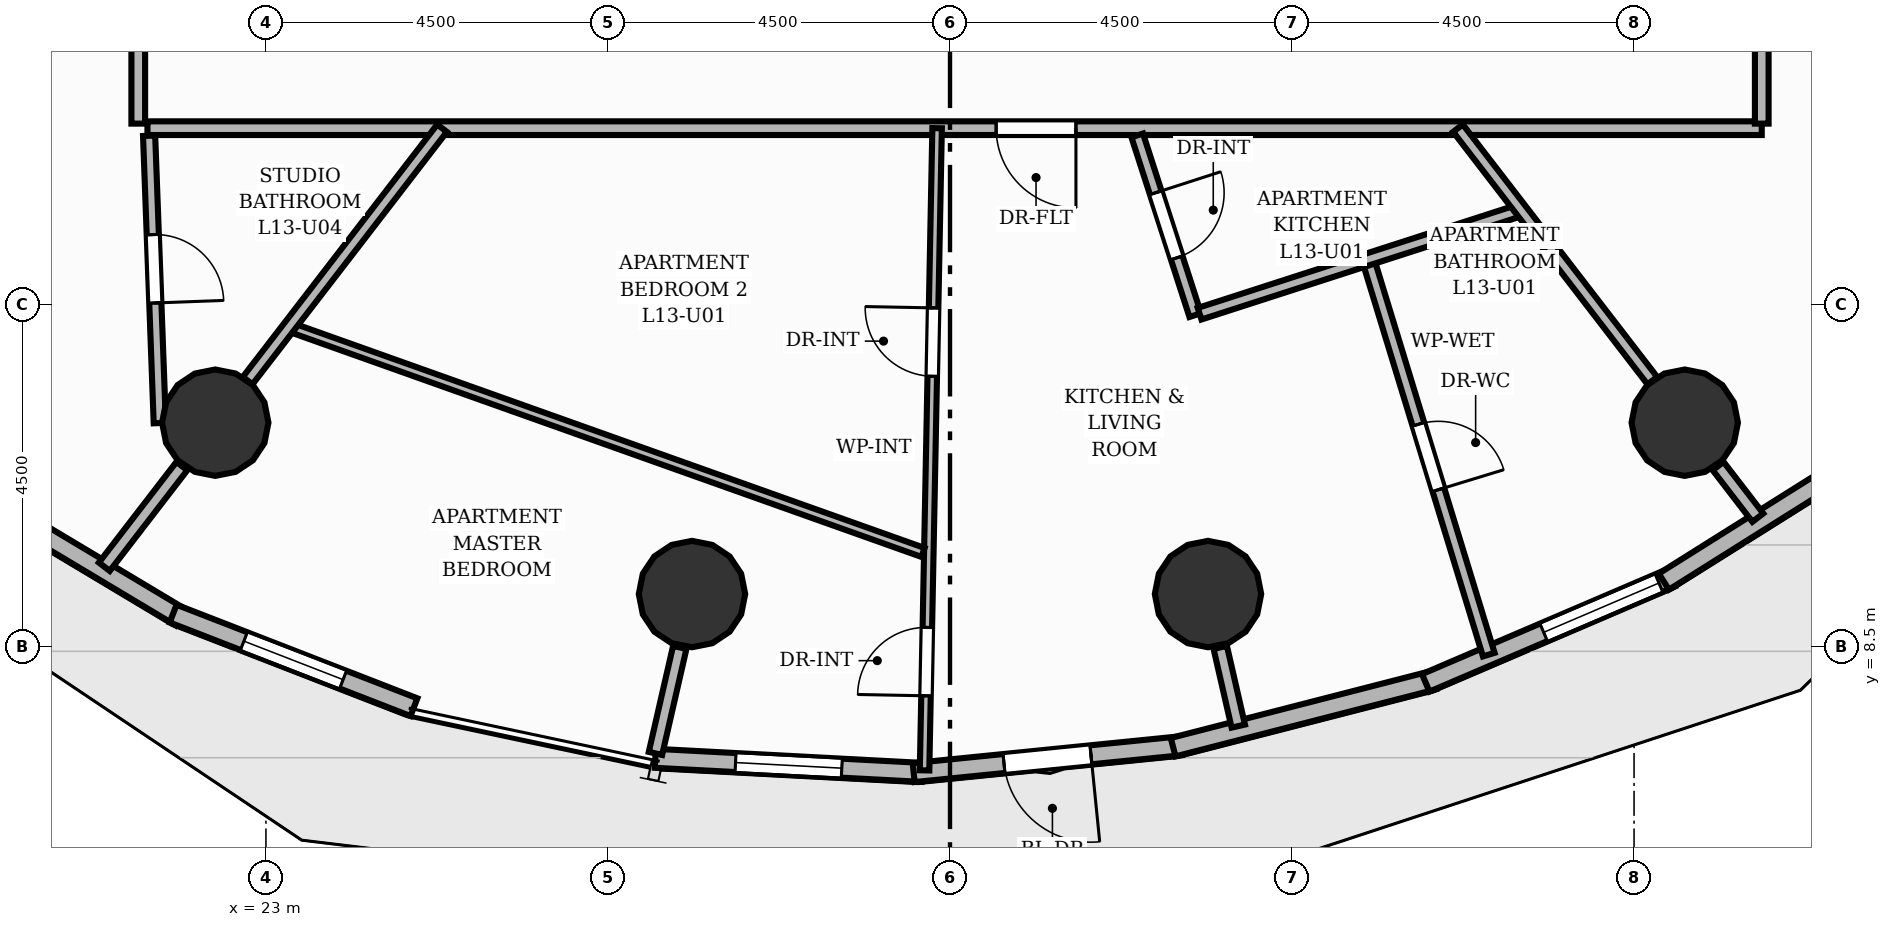
"""IFC4 building model, lengths in metres.
Left out: names, types, materials, properties, quantities, classifications, styles, units other than length and angle.
Written with IfcOpenShell. Run it as: python <this file> out.ifc"""

import sys

from ifc_helpers import new_model, si_unit, direction, frame, frame_2d, origin, origin_2d, place, context, subcontext, project, spatial, rectangle, circle, extrude, element, fill, save


model = new_model("IFC4")
c1 = context("Model", 3, precision=1e-05, world=origin(), true_north=direction((0.0, 1.0)))
c2 = subcontext(c1, "Body", "Model", "MODEL_VIEW")
j1 = project(units=[si_unit("LENGTHUNIT", "METRE"), si_unit("PLANEANGLEUNIT", "RADIAN")], contexts=[c1])
p1 = place(None, origin())
s1 = spatial("IfcSite", under=j1, at=p1, CompositionType="ELEMENT")
p2 = place(p1, origin())
s2 = spatial("IfcBuilding", under=s1, at=p2, CompositionType="ELEMENT")
p3 = place(p2, frame((0.0, 0.0, 47.2)))
s3 = spatial("IfcBuildingStorey", under=s2, at=p3, CompositionType="ELEMENT", Elevation=47.2)
for number, where, z_axis, x_axis in (
    (1, (22.333, 11.445, 0.0), (0.0, 0.0, 1.0), (1.0, 0.0, 0.0)),
    (2, (28.605, 9.19, 0.0), (0.0, 0.0, 1.0), (1.0, 0.0, 0.0)),
    (3, (35.395, 9.19, 0.0), (0.0, 0.0, 1.0), (1.0, 0.0, 0.0)),
    (4, (41.667, 11.445, 0.0), (0.0, 0.0, 1.0), (1.0, 0.0, 0.0)),
):
    element("IfcColumn", number, at=place(p3, frame(where, z_axis=z_axis, x_axis=x_axis)), inside=s3, PredefinedType="COLUMN", context=c2, shape_type="SweptSolid", body=[
        extrude(circle(Radius=0.7, at=origin_2d()), origin(), (0.0, 0.0, 1.0), 3.2),
    ])
p4 = place(p3, frame((21.878, 8.884, 0.0), z_axis=(0.0, 0.0, 1.0), x_axis=(-0.858069400356, 0.513533742001, 0.0)))
e5 = element("IfcWall", 5, at=p4, inside=s3, PredefinedType="SOLIDWALL", context=c2, shape_type="SweptSolid", body=[
    extrude(rectangle(XDim=3.323, YDim=0.25, at=frame_2d((1.661, 0.0))), origin(), (0.0, 0.0, 1.0), 2.96),
])
p5 = place(p3, frame((24.947, 7.702, 0.0), z_axis=(0.0, 0.0, 1.0), x_axis=(-0.932140755825, 0.362096135479, 0.0)))
e6 = element("IfcWall", 6, at=p5, inside=s3, PredefinedType="SOLIDWALL", context=c2, shape_type="SweptSolid", body=[
    extrude(rectangle(XDim=3.399, YDim=0.25, at=frame_2d((1.699, 0.0))), origin(), (0.0, 0.0, 1.0), 2.96),
])
p6 = place(p5, frame((1.0, 0.0, 0.85)))
e7 = element("IfcOpeningElement", 7, at=p6, cuts=e6, PredefinedType="OPENING", context=c2, shape_type="SweptSolid", body=[
    extrude(rectangle(XDim=1.4, YDim=1.55, at=frame_2d((0.7, 0.775))), frame((0.0, 0.135, 0.0), z_axis=(0.0, -1.0, 0.0), x_axis=(1.0, 0.0, 0.0)), (0.0, 0.0, 1.0), 0.27),
])
p7 = place(p3, frame((31.631, 6.844, 0.0), z_axis=(0.0, 0.0, 1.0), x_axis=(-0.99860782827, 0.052748510102, 0.0)))
e8 = element("IfcWall", 8, at=p7, inside=s3, PredefinedType="SOLIDWALL", context=c2, shape_type="SweptSolid", body=[
    extrude(rectangle(XDim=3.513, YDim=0.25, at=frame_2d((1.756, 0.0))), origin(), (0.0, 0.0, 1.0), 2.96),
])
p8 = place(p7, frame((1.056, 0.0, 0.85)))
e9 = element("IfcOpeningElement", 9, at=p8, cuts=e8, PredefinedType="OPENING", context=c2, shape_type="SweptSolid", body=[
    extrude(rectangle(XDim=1.4, YDim=1.55, at=frame_2d((0.7, 0.775))), frame((0.0, 0.135, 0.0), z_axis=(0.0, -1.0, 0.0), x_axis=(1.0, 0.0, 0.0)), (0.0, 0.0, 1.0), 0.27),
])
p9 = place(p3, frame((35.043, 7.194, 0.0), z_axis=(0.0, 0.0, 1.0), x_axis=(-0.994996115016, -0.099913618207, 0.0)))
e10 = element("IfcWall", 10, at=p9, inside=s3, PredefinedType="SOLIDWALL", context=c2, shape_type="SweptSolid", body=[
    extrude(rectangle(XDim=3.538, YDim=0.25, at=frame_2d((1.769, 0.0))), origin(), (0.0, 0.0, 1.0), 2.96),
])
p10 = place(p9, frame((1.194, 0.0, 0.0)))
e11 = element("IfcOpeningElement", 11, at=p10, cuts=e10, PredefinedType="OPENING", context=c2, shape_type="SweptSolid", body=[
    extrude(rectangle(XDim=1.15, YDim=2.2, at=frame_2d((0.575, 1.1))), frame((0.0, 0.135, 0.0), z_axis=(0.0, -1.0, 0.0), x_axis=(1.0, 0.0, 0.0)), (0.0, 0.0, 1.0), 0.27),
])
p11 = place(p3, frame((38.362, 8.057, 0.0), z_axis=(0.0, 0.0, 1.0), x_axis=(-0.968459637573, -0.249170484594, 0.0)))
e12 = element("IfcWall", 12, at=p11, inside=s3, PredefinedType="SOLIDWALL", context=c2, shape_type="SweptSolid", body=[
    extrude(rectangle(XDim=3.538, YDim=0.25, at=frame_2d((1.769, 0.0))), origin(), (0.0, 0.0, 1.0), 2.96),
])
p12 = place(p3, frame((41.489, 9.405, 0.0), z_axis=(0.0, 0.0, 1.0), x_axis=(-0.919263615987, -0.393642482872, 0.0)))
e13 = element("IfcWall", 13, at=p12, inside=s3, PredefinedType="SOLIDWALL", context=c2, shape_type="SweptSolid", body=[
    extrude(rectangle(XDim=3.513, YDim=0.25, at=frame_2d((1.756, 0.0))), origin(), (0.0, 0.0, 1.0), 2.96),
])
p13 = place(p12, frame((0.175, 0.0, 0.85)))
e14 = element("IfcOpeningElement", 14, at=p13, cuts=e13, PredefinedType="OPENING", context=c2, shape_type="SweptSolid", body=[
    extrude(rectangle(XDim=1.65, YDim=1.55, at=frame_2d((0.825, 0.775))), frame((0.0, 0.135, 0.0), z_axis=(0.0, -1.0, 0.0), x_axis=(1.0, 0.0, 0.0)), (0.0, 0.0, 1.0), 0.27),
])
p14 = place(p3, frame((44.326, 11.197, 0.0), z_axis=(0.0, 0.0, 1.0), x_axis=(-0.846852351865, -0.531828068215, 0.0)))
e15 = element("IfcWall", 15, at=p14, inside=s3, PredefinedType="SOLIDWALL", context=c2, shape_type="SweptSolid", body=[
    extrude(rectangle(XDim=3.465, YDim=0.25, at=frame_2d((1.732, 0.0))), origin(), (0.0, 0.0, 1.0), 2.96),
])
p15 = place(p3, frame((21.894, 10.874, 0.0), z_axis=(0.0, 0.0, 1.0), x_axis=(-0.610021184497, -0.792385104898, 0.0)))
e16 = element("IfcWall", 16, at=p15, inside=s3, PredefinedType="PARTITIONING", context=c2, shape_type="SweptSolid", body=[
    extrude(rectangle(XDim=1.672, YDim=0.18, at=frame_2d((0.836, 0.0))), origin(), (0.0, 0.0, 1.0), 2.178),
])
p16 = place(p3, frame((28.445, 8.488, 0.0), z_axis=(0.0, 0.0, 1.0), x_axis=(-0.223463944202, -0.974712196313, 0.0)))
e17 = element("IfcWall", 17, at=p16, inside=s3, PredefinedType="PARTITIONING", context=c2, shape_type="SweptSolid", body=[
    extrude(rectangle(XDim=1.431, YDim=0.18, at=frame_2d((0.716, 0.0))), origin(), (0.0, 0.0, 1.0), 2.178),
])
p17 = place(p3, frame((35.555, 8.488, 0.0), z_axis=(0.0, 0.0, 1.0), x_axis=(0.223348866575, -0.974738572028, 0.0)))
e18 = element("IfcWall", 18, at=p17, inside=s3, PredefinedType="PARTITIONING", context=c2, shape_type="SweptSolid", body=[
    extrude(rectangle(XDim=1.062, YDim=0.18, at=frame_2d((0.531, 0.0))), origin(), (0.0, 0.0, 1.0), 2.178),
])
p18 = place(p3, frame((42.106, 10.874, 0.0), z_axis=(0.0, 0.0, 1.0), x_axis=(0.610124026743, -0.792305920709, 0.0)))
e19 = element("IfcWall", 19, at=p18, inside=s3, PredefinedType="PARTITIONING", context=c2, shape_type="SweptSolid", body=[
    extrude(rectangle(XDim=0.856, YDim=0.18, at=frame_2d((0.428, 0.0))), origin(), (0.0, 0.0, 1.0), 2.178),
])
p19 = place(p3, frame((42.68, 15.32, 0.0), z_axis=(0.0, 0.0, 1.0), x_axis=(-1.0, 0.0, 0.0)))
e20 = element("IfcWall", 20, at=p19, inside=s3, PredefinedType="PARTITIONING", context=c2, shape_type="SweptSolid", body=[
    extrude(rectangle(XDim=21.239, YDim=0.18, at=frame_2d((10.619, 0.0))), origin(), (0.0, 0.0, 1.0), 2.955),
])
p20 = place(p19, frame((9.023, 0.0, 0.0)))
e21 = element("IfcOpeningElement", 21, at=p20, cuts=e20, PredefinedType="OPENING", context=c2, shape_type="SweptSolid", body=[
    extrude(rectangle(XDim=1.05, YDim=2.15, at=frame_2d((0.525, 1.075))), frame((0.0, 0.1, 0.0), z_axis=(0.0, -1.0, 0.0), x_axis=(1.0, 0.0, 0.0)), (0.0, 0.0, 1.0), 0.2),
])
p21 = place(p3, frame((42.68, 32.62, 0.0), z_axis=(0.0, 0.0, 1.0), x_axis=(0.0, -1.0, 0.0)))
e22 = element("IfcWall", 22, at=p21, inside=s3, PredefinedType="PARTITIONING", context=c2, shape_type="SweptSolid", body=[
    extrude(rectangle(XDim=17.24, YDim=0.18, at=frame_2d((8.62, 0.0))), origin(), (0.0, 0.0, 1.0), 2.955),
])
p22 = place(p21, frame((8.095, 0.0, 0.0)))
e23 = element("IfcOpeningElement", 23, at=p22, cuts=e22, PredefinedType="OPENING", context=c2, shape_type="SweptSolid", body=[
    extrude(rectangle(XDim=1.05, YDim=2.15, at=frame_2d((0.525, 1.075))), frame((0.0, 0.1, 0.0), z_axis=(0.0, -1.0, 0.0), x_axis=(1.0, 0.0, 0.0)), (0.0, 0.0, 1.0), 0.2),
])
p23 = place(p3, frame((21.32, 15.38, 0.0), z_axis=(0.0, 0.0, 1.0), x_axis=(0.0, 1.0, 0.0)))
e24 = element("IfcWall", 24, at=p23, inside=s3, PredefinedType="PARTITIONING", context=c2, shape_type="SweptSolid", body=[
    extrude(rectangle(XDim=17.3, YDim=0.18, at=frame_2d((8.65, 0.0))), origin(), (0.0, 0.0, 1.0), 2.955),
])
p24 = place(p23, frame((8.125, 0.0, 0.0)))
e25 = element("IfcOpeningElement", 25, at=p24, cuts=e24, PredefinedType="OPENING", context=c2, shape_type="SweptSolid", body=[
    extrude(rectangle(XDim=1.05, YDim=2.15, at=frame_2d((0.525, 1.075))), frame((0.0, 0.1, 0.0), z_axis=(0.0, -1.0, 0.0), x_axis=(1.0, 0.0, 0.0)), (0.0, 0.0, 1.0), 0.2),
])
p25 = place(p3, frame((37.5, 13.594, 0.0), z_axis=(0.0, 0.0, 1.0), x_axis=(0.292167210162, -0.956367252318, 0.0)))
e26 = element("IfcWall", 26, at=p25, inside=s3, PredefinedType="PLUMBINGWALL", context=c2, shape_type="SweptSolid", body=[
    extrude(rectangle(XDim=5.438, YDim=0.16, at=frame_2d((2.719, 0.0))), origin(), (0.0, 0.0, 1.0), 2.955),
])
p26 = place(p25, frame((2.269, 0.0, 0.0)))
e27 = element("IfcOpeningElement", 27, at=p26, cuts=e26, PredefinedType="OPENING", context=c2, shape_type="SweptSolid", body=[
    extrude(rectangle(XDim=0.9, YDim=2.1, at=frame_2d((0.45, 1.05))), frame((0.0, 0.09, 0.0), z_axis=(0.0, -1.0, 0.0), x_axis=(1.0, 0.0, 0.0)), (0.0, 0.0, 1.0), 0.18),
])
p27 = place(p3, frame((31.665, 6.87, 0.0), z_axis=(0.0, 0.0, 1.0), x_axis=(0.019528202577, 0.99980930647, 0.0)))
e28 = element("IfcWall", 28, at=p27, inside=s3, PredefinedType="PARTITIONING", context=c2, shape_type="SweptSolid", body=[
    extrude(rectangle(XDim=8.451, YDim=0.125, at=frame_2d((4.226, 0.0))), origin(), (0.0, 0.0, 1.0), 2.955),
])
p28 = place(p27, frame((0.981, 0.0, 0.0)))
e29 = element("IfcOpeningElement", 29, at=p28, cuts=e28, PredefinedType="OPENING", context=c2, shape_type="SweptSolid", body=[
    extrude(rectangle(XDim=0.9, YDim=2.1, at=frame_2d((0.45, 1.05))), frame((0.0, 0.073, 0.0), z_axis=(0.0, -1.0, 0.0), x_axis=(1.0, 0.0, 0.0)), (0.0, 0.0, 1.0), 0.145),
])
p29 = place(p27, frame((5.186, 0.0, 0.0)))
e30 = element("IfcOpeningElement", 30, at=p29, cuts=e28, PredefinedType="OPENING", context=c2, shape_type="SweptSolid", body=[
    extrude(rectangle(XDim=0.9, YDim=2.1, at=frame_2d((0.45, 1.05))), frame((0.0, 0.073, 0.0), z_axis=(0.0, -1.0, 0.0), x_axis=(1.0, 0.0, 0.0)), (0.0, 0.0, 1.0), 0.145),
])
p30 = place(p3, frame((34.463, 15.225, 0.0), z_axis=(0.0, 0.0, 1.0), x_axis=(0.307163549255, -0.951656741693, 0.0)))
e31 = element("IfcWall", 31, at=p30, inside=s3, PredefinedType="PLUMBINGWALL", context=c2, shape_type="SweptSolid", body=[
    extrude(rectangle(XDim=2.485, YDim=0.16, at=frame_2d((1.242, 0.0))), origin(), (0.0, 0.0, 1.0), 2.955),
])
p31 = place(p30, frame((0.792, 0.0, 0.0)))
e32 = element("IfcOpeningElement", 32, at=p31, cuts=e31, PredefinedType="OPENING", context=c2, shape_type="SweptSolid", body=[
    extrude(rectangle(XDim=0.9, YDim=2.1, at=frame_2d((0.45, 1.05))), frame((0.0, 0.09, 0.0), z_axis=(0.0, -1.0, 0.0), x_axis=(1.0, 0.0, 0.0)), (0.0, 0.0, 1.0), 0.18),
])
p32 = place(p3, frame((35.284, 12.879, 0.0), z_axis=(0.0, 0.0, 1.0), x_axis=(0.951640751353, 0.307213086253, 0.0)))
e33 = element("IfcWall", 33, at=p32, inside=s3, PredefinedType="PLUMBINGWALL", context=c2, shape_type="SweptSolid", body=[
    extrude(rectangle(XDim=4.443, YDim=0.16, at=frame_2d((2.222, 0.0))), origin(), (0.0, 0.0, 1.0), 2.955),
])
p33 = place(p3, frame((38.683, 15.32, 0.0), z_axis=(0.0, 0.0, 1.0), x_axis=(0.610070932863, -0.792346803411, 0.0)))
e34 = element("IfcWall", 34, at=p33, inside=s3, PredefinedType="PLUMBINGWALL", context=c2, shape_type="SweptSolid", body=[
    extrude(rectangle(XDim=4.192, YDim=0.16, at=frame_2d((2.096, 0.0))), origin(), (0.0, 0.0, 1.0), 2.178),
])
p34 = place(p3, frame((23.305, 12.707, 0.0), z_axis=(0.0, 0.0, 1.0), x_axis=(0.942091409395, -0.33535619324, 0.0)))
e35 = element("IfcWall", 35, at=p34, inside=s3, PredefinedType="PARTITIONING", context=c2, shape_type="SweptSolid", body=[
    extrude(rectangle(XDim=8.853, YDim=0.125, at=frame_2d((4.427, 0.0))), origin(), (0.0, 0.0, 1.0), 2.955),
])
p35 = place(p3, frame((22.759, 11.998, 0.0), z_axis=(0.0, 0.0, 1.0), x_axis=(0.610070932863, 0.792346803411, 0.0)))
e36 = element("IfcWall", 36, at=p35, inside=s3, PredefinedType="PLUMBINGWALL", context=c2, shape_type="SweptSolid", body=[
    extrude(rectangle(XDim=4.192, YDim=0.16, at=frame_2d((2.096, 0.0))), origin(), (0.0, 0.0, 1.0), 2.178),
])
p36 = place(p3, frame((21.463, 15.22, 0.0), z_axis=(0.0, 0.0, 1.0), x_axis=(0.037109528702, -0.99931120422, 0.0)))
e37 = element("IfcWall", 37, at=p36, inside=s3, PredefinedType="PLUMBINGWALL", context=c2, shape_type="SweptSolid", body=[
    extrude(rectangle(XDim=3.783, YDim=0.16, at=frame_2d((1.892, 0.0))), origin(), (0.0, 0.0, 1.0), 2.955),
])
p37 = place(p36, frame((1.302, 0.0, 0.0)))
e38 = element("IfcOpeningElement", 38, at=p37, cuts=e37, PredefinedType="OPENING", context=c2, shape_type="SweptSolid", body=[
    extrude(rectangle(XDim=0.9, YDim=2.1, at=frame_2d((0.45, 1.05))), frame((0.0, 0.09, 0.0), z_axis=(0.0, -1.0, 0.0), x_axis=(1.0, 0.0, 0.0)), (0.0, 0.0, 1.0), 0.18),
])
p38 = place(p10, origin())
e39 = element("IfcDoor", 39, at=p38, inside=s3, OperationType="SINGLE_SWING_LEFT", PredefinedType="DOOR", context=c2, shape_type="SweptSolid", body=[
    extrude(rectangle(XDim=1.15, YDim=2.2, at=frame_2d((0.575, 1.1))), frame((0.0, 0.025, 0.0), z_axis=(0.0, -1.0, 0.0), x_axis=(1.0, 0.0, 0.0)), (0.0, 0.0, 1.0), 0.05),
])
fill(e11, e39)
p39 = place(p6, origin())
e40 = element("IfcWindow", 40, at=p39, inside=s3, PartitioningType="SINGLE_PANEL", PredefinedType="WINDOW", context=c2, shape_type="SweptSolid", body=[
    extrude(rectangle(XDim=1.4, YDim=1.55, at=frame_2d((0.7, 0.775))), frame((0.0, 0.03, 0.0), z_axis=(0.0, -1.0, 0.0), x_axis=(1.0, 0.0, 0.0)), (0.0, 0.0, 1.0), 0.06),
])
fill(e7, e40)
p40 = place(p8, origin())
e41 = element("IfcWindow", 41, at=p40, inside=s3, PartitioningType="SINGLE_PANEL", PredefinedType="WINDOW", context=c2, shape_type="SweptSolid", body=[
    extrude(rectangle(XDim=1.4, YDim=1.55, at=frame_2d((0.7, 0.775))), frame((0.0, 0.03, 0.0), z_axis=(0.0, -1.0, 0.0), x_axis=(1.0, 0.0, 0.0)), (0.0, 0.0, 1.0), 0.06),
])
fill(e9, e41)
p41 = place(p13, origin())
e42 = element("IfcWindow", 42, at=p41, inside=s3, PartitioningType="SINGLE_PANEL", PredefinedType="WINDOW", context=c2, shape_type="SweptSolid", body=[
    extrude(rectangle(XDim=1.65, YDim=1.55, at=frame_2d((0.825, 0.775))), frame((0.0, 0.03, 0.0), z_axis=(0.0, -1.0, 0.0), x_axis=(1.0, 0.0, 0.0)), (0.0, 0.0, 1.0), 0.06),
])
fill(e14, e42)
p42 = place(p20, origin())
e43 = element("IfcDoor", 43, at=p42, inside=s3, OperationType="SINGLE_SWING_LEFT", PredefinedType="DOOR", context=c2, shape_type="SweptSolid", body=[
    extrude(rectangle(XDim=1.05, YDim=2.15, at=frame_2d((0.525, 1.075))), frame((0.0, 0.025, 0.0), z_axis=(0.0, -1.0, 0.0), x_axis=(1.0, 0.0, 0.0)), (0.0, 0.0, 1.0), 0.05),
])
fill(e21, e43)
p43 = place(p26, origin())
e44 = element("IfcDoor", 44, at=p43, inside=s3, OperationType="SINGLE_SWING_RIGHT", PredefinedType="DOOR", context=c2, shape_type="SweptSolid", body=[
    extrude(rectangle(XDim=0.9, YDim=2.1, at=frame_2d((0.45, 1.05))), frame((0.0, 0.025, 0.0), z_axis=(0.0, -1.0, 0.0), x_axis=(1.0, 0.0, 0.0)), (0.0, 0.0, 1.0), 0.05),
])
fill(e27, e44)
p44 = place(p28, origin())
e45 = element("IfcDoor", 45, at=p44, inside=s3, OperationType="SINGLE_SWING_LEFT", PredefinedType="DOOR", context=c2, shape_type="SweptSolid", body=[
    extrude(rectangle(XDim=0.9, YDim=2.1, at=frame_2d((0.45, 1.05))), frame((0.0, 0.025, 0.0), z_axis=(0.0, -1.0, 0.0), x_axis=(1.0, 0.0, 0.0)), (0.0, 0.0, 1.0), 0.05),
])
fill(e29, e45)
p45 = place(p29, origin())
e46 = element("IfcDoor", 46, at=p45, inside=s3, OperationType="SINGLE_SWING_RIGHT", PredefinedType="DOOR", context=c2, shape_type="SweptSolid", body=[
    extrude(rectangle(XDim=0.9, YDim=2.1, at=frame_2d((0.45, 1.05))), frame((0.0, 0.025, 0.0), z_axis=(0.0, -1.0, 0.0), x_axis=(1.0, 0.0, 0.0)), (0.0, 0.0, 1.0), 0.05),
])
fill(e30, e46)
p46 = place(p31, origin())
e47 = element("IfcDoor", 47, at=p46, inside=s3, OperationType="SINGLE_SWING_LEFT", PredefinedType="DOOR", context=c2, shape_type="SweptSolid", body=[
    extrude(rectangle(XDim=0.9, YDim=2.1, at=frame_2d((0.45, 1.05))), frame((0.0, 0.025, 0.0), z_axis=(0.0, -1.0, 0.0), x_axis=(1.0, 0.0, 0.0)), (0.0, 0.0, 1.0), 0.05),
])
fill(e32, e47)
p47 = place(p37, origin())
e48 = element("IfcDoor", 48, at=p47, inside=s3, OperationType="SINGLE_SWING_RIGHT", PredefinedType="DOOR", context=c2, shape_type="SweptSolid", body=[
    extrude(rectangle(XDim=0.9, YDim=2.1, at=frame_2d((0.45, 1.05))), frame((0.0, 0.025, 0.0), z_axis=(0.0, -1.0, 0.0), x_axis=(1.0, 0.0, 0.0)), (0.0, 0.0, 1.0), 0.05),
])
fill(e38, e48)
save(model, sys.argv[1])
